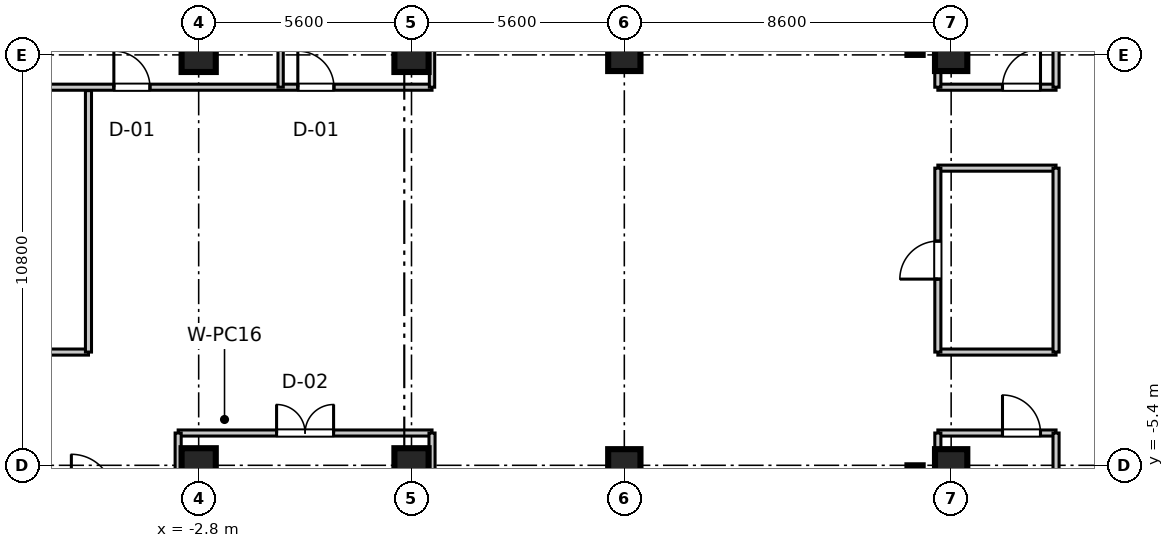
"""IFC4 building model, lengths in metres.
Left out: names, types, materials, properties, quantities, classifications, styles, units other than length and angle.
Written with IfcOpenShell. Run it as: python <this file> out.ifc"""

import sys

from ifc_helpers import new_model, si_unit, direction, frame, frame_2d, origin, origin_2d, place, context, subcontext, project, spatial, rectangle, extrude, source, transform, mapped, element, fill, save


model = new_model("IFC4")
c1 = context("Model", 3, precision=1e-05, world=origin(), true_north=direction((0.0, 1.0)))
c2 = subcontext(c1, "Body", "Model", "MODEL_VIEW")
j1 = project(units=[si_unit("LENGTHUNIT", "METRE"), si_unit("PLANEANGLEUNIT", "RADIAN")], contexts=[c1])
p1 = place(None, origin())
s1 = spatial("IfcSite", under=j1, at=p1, CompositionType="ELEMENT")
p2 = place(p1, origin())
s2 = spatial("IfcBuilding", under=s1, at=p2, CompositionType="ELEMENT")
p3 = place(p2, frame((0.0, 0.0, 266.3)))
s3 = spatial("IfcBuildingStorey", under=s2, at=p3, CompositionType="ELEMENT", Elevation=266.3)
m1 = source(origin(), c2, "Body", "SweptSolid", [
    extrude(rectangle(XDim=0.9, YDim=0.9, at=origin_2d()), origin(), (0.0, 0.0, 1.0), 3.705),
])
for number, where, z_axis, x_axis in (
    (1, (-2.8, -5.4, 0.0), (0.0, 0.0, 1.0), (1.0, 0.0, 0.0)),
    (2, (-2.8, 5.4, 0.0), (0.0, 0.0, 1.0), (1.0, 0.0, 0.0)),
    (3, (2.8, -5.4, 0.0), (0.0, 0.0, 1.0), (1.0, 0.0, 0.0)),
    (4, (2.8, 5.4, 0.0), (0.0, 0.0, 1.0), (1.0, 0.0, 0.0)),
):
    element("IfcColumn", number, at=place(p3, frame(where, z_axis=z_axis, x_axis=x_axis)), inside=s3, PredefinedType="COLUMN", context=c2, shape_type="MappedRepresentation", body=[
        mapped(m1, transform((0.0, 0.0, 0.0), scale=1.0)),
    ])
m2 = source(origin(), c2, "Body", "SweptSolid", [
    extrude(rectangle(XDim=0.85, YDim=0.85, at=origin_2d()), origin(), (0.0, 0.0, 1.0), 3.705),
])
for number, where, z_axis, x_axis in (
    (5, (8.4, -5.4, 0.0), (0.0, 0.0, 1.0), (1.0, 0.0, 0.0)),
    (6, (8.4, 5.4, 0.0), (0.0, 0.0, 1.0), (1.0, 0.0, 0.0)),
    (7, (17.0, -5.4, 0.0), (0.0, 0.0, 1.0), (1.0, 0.0, 0.0)),
    (8, (17.0, 5.4, 0.0), (0.0, 0.0, 1.0), (1.0, 0.0, 0.0)),
):
    element("IfcColumn", number, at=place(p3, frame(where, z_axis=z_axis, x_axis=x_axis)), inside=s3, PredefinedType="PILASTER", context=c2, shape_type="MappedRepresentation", body=[
        mapped(m2, transform((0.0, 0.0, 0.0), scale=1.0)),
    ])
m3 = source(origin(), c2, "Body", "SweptSolid", [
    extrude(rectangle(XDim=11.6, YDim=0.4, at=frame_2d((5.8, 0.0))), origin(), (0.0, 0.0, 1.0), 3.45),
])
for number, where, z_axis, x_axis in (
    (9, (16.05, 5.4, 0.0), (0.0, 0.0, 1.0), (0.0, 1.0, 0.0)),
    (10, (16.05, -17.0, 0.0), (0.0, 0.0, 1.0), (0.0, 1.0, 0.0)),
):
    element("IfcWall", number, at=place(p3, frame(where, z_axis=z_axis, x_axis=x_axis)), inside=s3, PredefinedType="SHEAR", context=c2, shape_type="MappedRepresentation", body=[
        mapped(m3, transform((0.0, 0.0, 0.0), scale=1.0)),
    ])
m4 = source(origin(), c2, "Body", "SweptSolid", [
    extrude(rectangle(XDim=3.11, YDim=0.16, at=frame_2d((1.555, 0.0))), origin(), (0.0, 0.0, 1.0), 2.79),
])
p4 = place(p3, frame((16.65, 4.55, 0.0), z_axis=(0.0, 0.0, 1.0), x_axis=(1.0, 0.0, 0.0)))
e11 = element("IfcWall", 11, at=p4, inside=s3, PredefinedType="PARTITIONING", context=c2, shape_type="MappedRepresentation", body=[
    mapped(m4, transform((0.0, 0.0, 0.0), scale=1.0)),
])
p5 = place(p4, frame((1.701, 0.0, 0.0)))
e12 = element("IfcOpeningElement", 12, at=p5, cuts=e11, PredefinedType="OPENING", context=c2, shape_type="SweptSolid", body=[
    extrude(rectangle(XDim=1.0, YDim=2.1, at=frame_2d((0.5, 1.05))), frame((0.0, 0.09, 0.0), z_axis=(0.0, -1.0, 0.0), x_axis=(1.0, 0.0, 0.0)), (0.0, 0.0, 1.0), 0.18),
])
m5 = source(origin(), c2, "Body", "SweptSolid", [
    extrude(rectangle(XDim=17.95, YDim=0.16, at=frame_2d((8.975, 0.0))), origin(), (0.0, 0.0, 1.0), 2.79),
])
p6 = place(p3, frame((16.65, 4.55, 0.0), z_axis=(0.0, 0.0, 1.0), x_axis=(0.0, 1.0, 0.0)))
e13 = element("IfcWall", 13, at=p6, inside=s3, PredefinedType="PARTITIONING", context=c2, shape_type="MappedRepresentation", body=[
    mapped(m5, transform((0.0, 0.0, 0.0), scale=1.0)),
])
m6 = source(origin(), c2, "Body", "SweptSolid", [
    extrude(rectangle(XDim=16.53, YDim=0.16, at=frame_2d((8.265, 0.0))), origin(), (0.0, 0.0, 1.0), 2.79),
])
p7 = place(p3, frame((19.76, 4.55, 0.0), z_axis=(0.0, 0.0, 1.0), x_axis=(0.0, 1.0, 0.0)))
e14 = element("IfcWall", 14, at=p7, inside=s3, PredefinedType="PARTITIONING", context=c2, shape_type="MappedRepresentation", body=[
    mapped(m6, transform((0.0, 0.0, 0.0), scale=1.0)),
])
p8 = place(p3, frame((16.65, -4.55, 0.0), z_axis=(0.0, 0.0, 1.0), x_axis=(1.0, 0.0, 0.0)))
e15 = element("IfcWall", 15, at=p8, inside=s3, PredefinedType="PARTITIONING", context=c2, shape_type="MappedRepresentation", body=[
    mapped(m4, transform((0.0, 0.0, 0.0), scale=1.0)),
])
p9 = place(p8, frame((1.701, 0.0, 0.0)))
e16 = element("IfcOpeningElement", 16, at=p9, cuts=e15, PredefinedType="OPENING", context=c2, shape_type="SweptSolid", body=[
    extrude(rectangle(XDim=1.0, YDim=2.1, at=frame_2d((0.5, 1.05))), frame((0.0, 0.09, 0.0), z_axis=(0.0, -1.0, 0.0), x_axis=(1.0, 0.0, 0.0)), (0.0, 0.0, 1.0), 0.18),
])
p10 = place(p3, frame((16.65, -22.5, 0.0), z_axis=(0.0, 0.0, 1.0), x_axis=(0.0, 1.0, 0.0)))
e17 = element("IfcWall", 17, at=p10, inside=s3, PredefinedType="PARTITIONING", context=c2, shape_type="MappedRepresentation", body=[
    mapped(m5, transform((0.0, 0.0, 0.0), scale=1.0)),
])
p11 = place(p3, frame((19.76, -21.08, 0.0), z_axis=(0.0, 0.0, 1.0), x_axis=(0.0, 1.0, 0.0)))
e18 = element("IfcWall", 18, at=p11, inside=s3, PredefinedType="PARTITIONING", context=c2, shape_type="MappedRepresentation", body=[
    mapped(m6, transform((0.0, 0.0, 0.0), scale=1.0)),
])
m7 = source(origin(), c2, "Body", "SweptSolid", [
    extrude(rectangle(XDim=23.1, YDim=0.16, at=frame_2d((11.55, 0.0))), origin(), (0.0, 0.0, 1.0), 2.79),
])
p12 = place(p3, frame((-19.76, 4.55, 0.0), z_axis=(0.0, 0.0, 1.0), x_axis=(1.0, 0.0, 0.0)))
e19 = element("IfcWall", 19, at=p12, inside=s3, PredefinedType="PARTITIONING", context=c2, shape_type="MappedRepresentation", body=[
    mapped(m7, transform((0.0, 0.0, 0.0), scale=1.0)),
])
p13 = place(p12, frame((14.728, 0.0, 0.0)))
e20 = element("IfcOpeningElement", 20, at=p13, cuts=e19, PredefinedType="OPENING", context=c2, shape_type="SweptSolid", body=[
    extrude(rectangle(XDim=0.95, YDim=2.1, at=frame_2d((0.475, 1.05))), frame((0.0, 0.09, 0.0), z_axis=(0.0, -1.0, 0.0), x_axis=(1.0, 0.0, 0.0)), (0.0, 0.0, 1.0), 0.18),
])
p14 = place(p12, frame((19.569, 0.0, 0.0)))
e21 = element("IfcOpeningElement", 21, at=p14, cuts=e19, PredefinedType="OPENING", context=c2, shape_type="SweptSolid", body=[
    extrude(rectangle(XDim=0.95, YDim=2.1, at=frame_2d((0.475, 1.05))), frame((0.0, 0.09, 0.0), z_axis=(0.0, -1.0, 0.0), x_axis=(1.0, 0.0, 0.0)), (0.0, 0.0, 1.0), 0.18),
])
m8 = source(origin(), c2, "Body", "SweptSolid", [
    extrude(rectangle(XDim=17.95, YDim=0.14, at=frame_2d((8.975, 0.0))), origin(), (0.0, 0.0, 1.0), 2.79),
])
for number, where, z_axis, x_axis in (
    (22, (3.34, 4.55, 0.0), (0.0, 0.0, 1.0), (0.0, 1.0, 0.0)),
    (23, (-0.644, 4.55, 0.0), (0.0, 0.0, 1.0), (0.0, 1.0, 0.0)),
):
    element("IfcWall", number, at=place(p3, frame(where, z_axis=z_axis, x_axis=x_axis)), inside=s3, PredefinedType="PARTITIONING", context=c2, shape_type="MappedRepresentation", body=[
        mapped(m8, transform((0.0, 0.0, 0.0), scale=1.0)),
    ])
m9 = source(origin(), c2, "Body", "SweptSolid", [
    extrude(rectangle(XDim=6.68, YDim=0.16, at=frame_2d((3.34, 0.0))), origin(), (0.0, 0.0, 1.0), 2.79),
])
p15 = place(p3, frame((-3.34, -4.55, 0.0), z_axis=(0.0, 0.0, 1.0), x_axis=(1.0, 0.0, 0.0)))
e24 = element("IfcWall", 24, at=p15, inside=s3, PredefinedType="PARTITIONING", context=c2, shape_type="MappedRepresentation", body=[
    mapped(m9, transform((0.0, 0.0, 0.0), scale=1.0)),
])
p16 = place(p15, frame((2.59, 0.0, 0.0)))
e25 = element("IfcOpeningElement", 25, at=p16, cuts=e24, PredefinedType="OPENING", context=c2, shape_type="SweptSolid", body=[
    extrude(rectangle(XDim=1.5, YDim=2.15, at=frame_2d((0.75, 1.075))), frame((0.0, 0.09, 0.0), z_axis=(0.0, -1.0, 0.0), x_axis=(1.0, 0.0, 0.0)), (0.0, 0.0, 1.0), 0.18),
])
for number, where, z_axis, x_axis in (
    (26, (-3.34, -22.5, 0.0), (0.0, 0.0, 1.0), (0.0, 1.0, 0.0)),
    (27, (3.34, -22.5, 0.0), (0.0, 0.0, 1.0), (0.0, 1.0, 0.0)),
):
    element("IfcWall", number, at=place(p3, frame(where, z_axis=z_axis, x_axis=x_axis)), inside=s3, PredefinedType="PARTITIONING", context=c2, shape_type="MappedRepresentation", body=[
        mapped(m5, transform((0.0, 0.0, 0.0), scale=1.0)),
    ])
m10 = source(origin(), c2, "Body", "SweptSolid", [
    extrude(rectangle(XDim=16.8, YDim=0.16, at=frame_2d((8.4, 0.0))), origin(), (0.0, 0.0, 1.0), 2.79),
])
p17 = place(p3, frame((-22.5, -2.42, 0.0), z_axis=(0.0, 0.0, 1.0), x_axis=(1.0, 0.0, 0.0)))
e28 = element("IfcWall", 28, at=p17, inside=s3, PredefinedType="PARTITIONING", context=c2, shape_type="MappedRepresentation", body=[
    mapped(m10, transform((0.0, 0.0, 0.0), scale=1.0)),
])
p18 = place(p17, frame((8.958, 0.0, 0.0)))
e29 = element("IfcOpeningElement", 29, at=p18, cuts=e28, PredefinedType="OPENING", context=c2, shape_type="SweptSolid", body=[
    extrude(rectangle(XDim=1.5, YDim=2.15, at=frame_2d((0.75, 1.075))), frame((0.0, 0.09, 0.0), z_axis=(0.0, -1.0, 0.0), x_axis=(1.0, 0.0, 0.0)), (0.0, 0.0, 1.0), 0.18),
])
m11 = source(origin(), c2, "Body", "SweptSolid", [
    extrude(rectangle(XDim=6.88, YDim=0.16, at=frame_2d((3.44, 0.0))), origin(), (0.0, 0.0, 1.0), 2.79),
])
p19 = place(p3, frame((-5.7, -2.42, 0.0), z_axis=(0.0, 0.0, 1.0), x_axis=(0.0, 1.0, 0.0)))
e30 = element("IfcWall", 30, at=p19, inside=s3, PredefinedType="PARTITIONING", context=c2, shape_type="MappedRepresentation", body=[
    mapped(m11, transform((0.0, 0.0, 0.0), scale=1.0)),
])
for number, where, z_axis, x_axis in (
    (31, (16.65, -2.42, 0.0), (0.0, 0.0, 1.0), (1.0, 0.0, 0.0)),
    (32, (16.65, 2.42, 0.0), (0.0, 0.0, 1.0), (1.0, 0.0, 0.0)),
):
    element("IfcWall", number, at=place(p3, frame(where, z_axis=z_axis, x_axis=x_axis)), inside=s3, PredefinedType="PARTITIONING", context=c2, shape_type="MappedRepresentation", body=[
        mapped(m4, transform((0.0, 0.0, 0.0), scale=1.0)),
    ])
m12 = source(origin(), c2, "Body", "SweptSolid", [
    extrude(rectangle(XDim=4.84, YDim=0.16, at=frame_2d((2.42, 0.0))), origin(), (0.0, 0.0, 1.0), 2.79),
])
p20 = place(p3, frame((16.65, -2.42, 0.0), z_axis=(0.0, 0.0, 1.0), x_axis=(0.0, 1.0, 0.0)))
e33 = element("IfcWall", 33, at=p20, inside=s3, PredefinedType="PARTITIONING", context=c2, shape_type="MappedRepresentation", body=[
    mapped(m12, transform((0.0, 0.0, 0.0), scale=1.0)),
])
p21 = place(p20, frame((1.92, 0.0, 0.0)))
e34 = element("IfcOpeningElement", 34, at=p21, cuts=e33, PredefinedType="OPENING", context=c2, shape_type="SweptSolid", body=[
    extrude(rectangle(XDim=1.0, YDim=2.1, at=frame_2d((0.5, 1.05))), frame((0.0, 0.09, 0.0), z_axis=(0.0, -1.0, 0.0), x_axis=(1.0, 0.0, 0.0)), (0.0, 0.0, 1.0), 0.18),
])
p22 = place(p3, frame((19.76, -2.42, 0.0), z_axis=(0.0, 0.0, 1.0), x_axis=(0.0, 1.0, 0.0)))
e35 = element("IfcWall", 35, at=p22, inside=s3, PredefinedType="PARTITIONING", context=c2, shape_type="MappedRepresentation", body=[
    mapped(m12, transform((0.0, 0.0, 0.0), scale=1.0)),
])
m13 = source(origin(), c2, "Body", "SweptSolid", [
    extrude(rectangle(XDim=1.0, YDim=2.1, at=frame_2d((0.5, 1.05))), frame((0.0, 0.025, 0.0), z_axis=(0.0, -1.0, 0.0), x_axis=(1.0, 0.0, 0.0)), (0.0, 0.0, 1.0), 0.05),
])
p23 = place(p5, origin())
e36 = element("IfcDoor", 36, at=p23, inside=s3, OperationType="SINGLE_SWING_RIGHT", PredefinedType="DOOR", context=c2, shape_type="MappedRepresentation", body=[
    mapped(m13, transform((0.0, 0.0, 0.0), scale=1.0)),
])
fill(e12, e36)
p24 = place(p9, frame((1.0, 0.0, 0.0), z_axis=(0.0, 0.0, 1.0), x_axis=(-1.0, 0.0, 0.0)))
e37 = element("IfcDoor", 37, at=p24, inside=s3, OperationType="SINGLE_SWING_LEFT", PredefinedType="DOOR", context=c2, shape_type="MappedRepresentation", body=[
    mapped(m13, transform((0.0, 0.0, 0.0), scale=1.0)),
])
fill(e16, e37)
m14 = source(origin(), c2, "Body", "SweptSolid", [
    extrude(rectangle(XDim=0.95, YDim=2.1, at=frame_2d((0.475, 1.05))), frame((0.0, 0.025, 0.0), z_axis=(0.0, -1.0, 0.0), x_axis=(1.0, 0.0, 0.0)), (0.0, 0.0, 1.0), 0.05),
])
p25 = place(p13, origin())
e38 = element("IfcDoor", 38, at=p25, inside=s3, OperationType="SINGLE_SWING_LEFT", PredefinedType="DOOR", context=c2, shape_type="MappedRepresentation", body=[
    mapped(m14, transform((0.0, 0.0, 0.0), scale=1.0)),
])
fill(e20, e38)
p26 = place(p14, origin())
e39 = element("IfcDoor", 39, at=p26, inside=s3, OperationType="SINGLE_SWING_LEFT", PredefinedType="DOOR", context=c2, shape_type="MappedRepresentation", body=[
    mapped(m14, transform((0.0, 0.0, 0.0), scale=1.0)),
])
fill(e21, e39)
m15 = source(origin(), c2, "Body", "SweptSolid", [
    extrude(rectangle(XDim=1.5, YDim=2.15, at=frame_2d((0.75, 1.075))), frame((0.0, 0.025, 0.0), z_axis=(0.0, -1.0, 0.0), x_axis=(1.0, 0.0, 0.0)), (0.0, 0.0, 1.0), 0.05),
])
p27 = place(p16, frame((1.5, 0.0, 0.0), z_axis=(0.0, 0.0, 1.0), x_axis=(-1.0, 0.0, 0.0)))
e40 = element("IfcDoor", 40, at=p27, inside=s3, OperationType="DOUBLE_DOOR_SINGLE_SWING", PredefinedType="DOOR", context=c2, shape_type="MappedRepresentation", body=[
    mapped(m15, transform((0.0, 0.0, 0.0), scale=1.0)),
])
fill(e25, e40)
p28 = place(p21, frame((1.0, 0.0, 0.0), z_axis=(0.0, 0.0, 1.0), x_axis=(-1.0, 0.0, 0.0)))
e41 = element("IfcDoor", 41, at=p28, inside=s3, OperationType="SINGLE_SWING_LEFT", PredefinedType="DOOR", context=c2, shape_type="MappedRepresentation", body=[
    mapped(m13, transform((0.0, 0.0, 0.0), scale=1.0)),
])
fill(e34, e41)
save(model, sys.argv[1])
